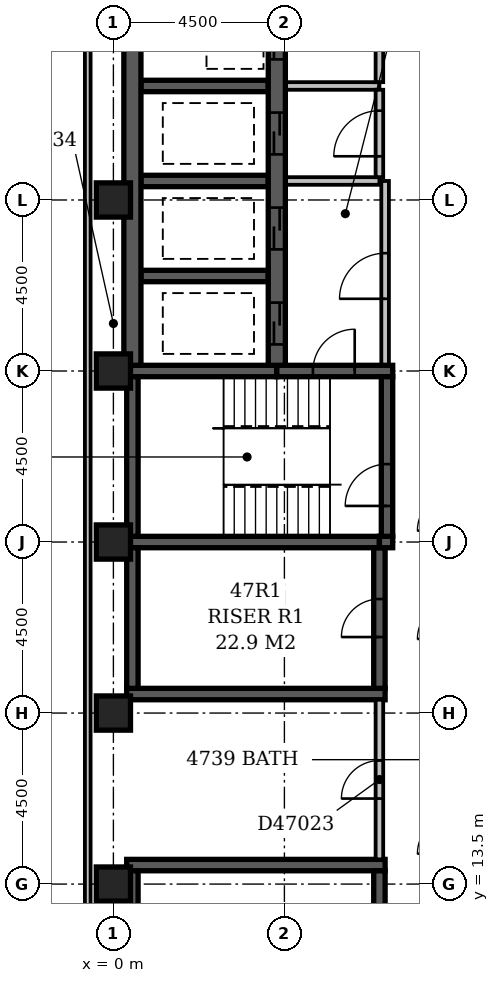
"""IFC4 building model, lengths in metres.
Left out: names, types, materials, properties, quantities, classifications, styles, units other than length and angle.
Written with IfcOpenShell. Run it as: python <this file> out.ifc"""

import sys

from ifc_helpers import new_model, si_unit, direction, frame, frame_2d, origin, origin_2d, place, context, subcontext, project, spatial, rectangle, extrude, element, fill, save


model = new_model("IFC4")
c1 = context("Model", 3, precision=1e-05, world=origin(), true_north=direction((0.0, 1.0)))
c2 = subcontext(c1, "Body", "Model", "MODEL_VIEW")
j1 = project(units=[si_unit("LENGTHUNIT", "METRE"), si_unit("PLANEANGLEUNIT", "RADIAN")], contexts=[c1])
p1 = place(None, origin())
s1 = spatial("IfcSite", under=j1, at=p1, CompositionType="ELEMENT")
p2 = place(p1, origin())
s2 = spatial("IfcBuilding", under=s1, at=p2, CompositionType="ELEMENT")
p3 = place(p2, frame((0.0, 0.0, 186.2)))
s3 = spatial("IfcBuildingStorey", under=s2, at=p3, CompositionType="ELEMENT", Elevation=186.2)
for number, where, z_axis, x_axis in (
    (1, (0.35, 14.0, -0.35), (0.0, 0.0, 1.0), (1.0, 0.0, 0.0)),
    (2, (0.35, 18.5, -0.35), (0.0, 0.0, 1.0), (1.0, 0.0, 0.0)),
):
    element("IfcWall", number, at=place(p3, frame(where, z_axis=z_axis, x_axis=x_axis)), inside=s3, PredefinedType="SHEAR", context=c2, shape_type="SweptSolid", body=[
        extrude(rectangle(XDim=6.8, YDim=0.3, at=frame_2d((3.4, 0.0))), origin(), (0.0, 0.0, 1.0), 3.65),
    ])
p4 = place(p3, frame((0.35, 22.5, -0.35), z_axis=(0.0, 0.0, 1.0), x_axis=(1.0, 0.0, 0.0)))
e3 = element("IfcWall", 3, at=p4, inside=s3, PredefinedType="SHEAR", context=c2, shape_type="SweptSolid", body=[
    extrude(rectangle(XDim=6.65, YDim=0.3, at=frame_2d((3.325, 0.0))), origin(), (0.0, 0.0, 1.0), 3.65),
])
p5 = place(p3, frame((0.35, 27.0, -0.35), z_axis=(0.0, 0.0, 1.0), x_axis=(1.0, 0.0, 0.0)))
e4 = element("IfcWall", 4, at=p5, inside=s3, PredefinedType="SHEAR", context=c2, shape_type="SweptSolid", body=[
    extrude(rectangle(XDim=3.95, YDim=0.3, at=frame_2d((1.975, 0.0))), origin(), (0.0, 0.0, 1.0), 3.65),
])
for number, where, z_axis, x_axis in (
    (5, (0.5, 10.15, -0.35), (0.0, 0.0, 1.0), (0.0, 1.0, 0.0)),
    (6, (0.5, 18.65, -0.35), (0.0, 0.0, 1.0), (0.0, 1.0, 0.0)),
):
    element("IfcWall", number, at=place(p3, frame(where, z_axis=z_axis, x_axis=x_axis)), inside=s3, PredefinedType="SHEAR", context=c2, shape_type="SweptSolid", body=[
        extrude(rectangle(XDim=3.7, YDim=0.3, at=frame_2d((1.85, 0.0))), origin(), (0.0, 0.0, 1.0), 3.65),
    ])
p6 = place(p3, frame((0.5, 22.65, -0.35), z_axis=(0.0, 0.0, 1.0), x_axis=(0.0, 1.0, 0.0)))
e7 = element("IfcWall", 7, at=p6, inside=s3, PredefinedType="SHEAR", context=c2, shape_type="SweptSolid", body=[
    extrude(rectangle(XDim=4.2, YDim=0.3, at=frame_2d((2.1, 0.0))), origin(), (0.0, 0.0, 1.0), 3.65),
])
p7 = place(p3, frame((0.5, 27.15, -0.35), z_axis=(0.0, 0.0, 1.0), x_axis=(0.0, 1.0, 0.0)))
e8 = element("IfcWall", 8, at=p7, inside=s3, PredefinedType="SHEAR", context=c2, shape_type="SweptSolid", body=[
    extrude(rectangle(XDim=22.125, YDim=0.45, at=frame_2d((11.062, 0.0))), origin(), (0.0, 0.0, 1.0), 3.65),
])
for number, where, z_axis, x_axis in (
    (9, (0.725, 29.5, -0.35), (0.0, 0.0, 1.0), (1.0, 0.0, 0.0)),
    (10, (0.725, 32.0, -0.35), (0.0, 0.0, 1.0), (1.0, 0.0, 0.0)),
    (11, (0.725, 34.5, -0.35), (0.0, 0.0, 1.0), (1.0, 0.0, 0.0)),
):
    element("IfcWall", number, at=place(p3, frame(where, z_axis=z_axis, x_axis=x_axis)), inside=s3, PredefinedType="SHEAR", context=c2, shape_type="SweptSolid", body=[
        extrude(rectangle(XDim=3.35, YDim=0.3, at=frame_2d((1.675, 0.0))), origin(), (0.0, 0.0, 1.0), 3.65),
    ])
p8 = place(p3, frame((4.3, 27.0, -0.35), z_axis=(0.0, 0.0, 1.0), x_axis=(1.0, 0.0, 0.0)))
e12 = element("IfcWall", 12, at=p8, inside=s3, PredefinedType="SHEAR", context=c2, shape_type="SweptSolid", body=[
    extrude(rectangle(XDim=3.05, YDim=0.3, at=frame_2d((1.525, 0.0))), origin(), (0.0, 0.0, 1.0), 3.65),
])
p9 = place(p8, frame((0.95, 0.0, 0.35)))
e13 = element("IfcOpeningElement", 13, at=p9, cuts=e12, PredefinedType="OPENING", context=c2, shape_type="SweptSolid", body=[
    extrude(rectangle(XDim=1.1, YDim=2.1, at=frame_2d((0.55, 1.05))), frame((0.0, 0.162, 0.0), z_axis=(0.0, -1.0, 0.0), x_axis=(1.0, 0.0, 0.0)), (0.0, 0.0, 1.0), 0.324),
])
p10 = place(p3, frame((4.3, 27.15, -0.35), z_axis=(0.0, 0.0, 1.0), x_axis=(0.0, 1.0, 0.0)))
e14 = element("IfcWall", 14, at=p10, inside=s3, PredefinedType="SHEAR", context=c2, shape_type="SweptSolid", body=[
    extrude(rectangle(XDim=22.125, YDim=0.45, at=frame_2d((11.062, 0.0))), origin(), (0.0, 0.0, 1.0), 3.65),
])
p11 = place(p10, frame((3.05, 0.0, 0.35)))
e15 = element("IfcOpeningElement", 15, at=p11, cuts=e14, PredefinedType="OPENING", context=c2, shape_type="SweptSolid", body=[
    extrude(rectangle(XDim=1.1, YDim=2.1, at=frame_2d((0.55, 1.05))), frame((0.0, 0.237, 0.0), z_axis=(0.0, -1.0, 0.0), x_axis=(1.0, 0.0, 0.0)), (0.0, 0.0, 1.0), 0.474),
])
p12 = place(p10, frame((0.55, 0.0, 0.35)))
e16 = element("IfcOpeningElement", 16, at=p12, cuts=e14, PredefinedType="OPENING", context=c2, shape_type="SweptSolid", body=[
    extrude(rectangle(XDim=1.1, YDim=2.1, at=frame_2d((0.55, 1.05))), frame((0.0, 0.237, 0.0), z_axis=(0.0, -1.0, 0.0), x_axis=(1.0, 0.0, 0.0)), (0.0, 0.0, 1.0), 0.474),
])
p13 = place(p10, frame((20.55, 0.0, 0.35)))
e17 = element("IfcOpeningElement", 17, at=p13, cuts=e14, PredefinedType="OPENING", context=c2, shape_type="SweptSolid", body=[
    extrude(rectangle(XDim=1.1, YDim=2.1, at=frame_2d((0.55, 1.05))), frame((0.0, 0.237, 0.0), z_axis=(0.0, -1.0, 0.0), x_axis=(1.0, 0.0, 0.0)), (0.0, 0.0, 1.0), 0.474),
])
p14 = place(p10, frame((18.05, 0.0, 0.35)))
e18 = element("IfcOpeningElement", 18, at=p14, cuts=e14, PredefinedType="OPENING", context=c2, shape_type="SweptSolid", body=[
    extrude(rectangle(XDim=1.1, YDim=2.1, at=frame_2d((0.55, 1.05))), frame((0.0, 0.237, 0.0), z_axis=(0.0, -1.0, 0.0), x_axis=(1.0, 0.0, 0.0)), (0.0, 0.0, 1.0), 0.474),
])
p15 = place(p10, frame((15.55, 0.0, 0.35)))
e19 = element("IfcOpeningElement", 19, at=p15, cuts=e14, PredefinedType="OPENING", context=c2, shape_type="SweptSolid", body=[
    extrude(rectangle(XDim=1.1, YDim=2.1, at=frame_2d((0.55, 1.05))), frame((0.0, 0.237, 0.0), z_axis=(0.0, -1.0, 0.0), x_axis=(1.0, 0.0, 0.0)), (0.0, 0.0, 1.0), 0.474),
])
p16 = place(p10, frame((13.05, 0.0, 0.35)))
e20 = element("IfcOpeningElement", 20, at=p16, cuts=e14, PredefinedType="OPENING", context=c2, shape_type="SweptSolid", body=[
    extrude(rectangle(XDim=1.1, YDim=2.1, at=frame_2d((0.55, 1.05))), frame((0.0, 0.237, 0.0), z_axis=(0.0, -1.0, 0.0), x_axis=(1.0, 0.0, 0.0)), (0.0, 0.0, 1.0), 0.474),
])
p17 = place(p10, frame((10.55, 0.0, 0.35)))
e21 = element("IfcOpeningElement", 21, at=p17, cuts=e14, PredefinedType="OPENING", context=c2, shape_type="SweptSolid", body=[
    extrude(rectangle(XDim=1.1, YDim=2.1, at=frame_2d((0.55, 1.05))), frame((0.0, 0.237, 0.0), z_axis=(0.0, -1.0, 0.0), x_axis=(1.0, 0.0, 0.0)), (0.0, 0.0, 1.0), 0.474),
])
p18 = place(p10, frame((8.05, 0.0, 0.35)))
e22 = element("IfcOpeningElement", 22, at=p18, cuts=e14, PredefinedType="OPENING", context=c2, shape_type="SweptSolid", body=[
    extrude(rectangle(XDim=1.1, YDim=2.1, at=frame_2d((0.55, 1.05))), frame((0.0, 0.237, 0.0), z_axis=(0.0, -1.0, 0.0), x_axis=(1.0, 0.0, 0.0)), (0.0, 0.0, 1.0), 0.474),
])
p19 = place(p10, frame((5.55, 0.0, 0.35)))
e23 = element("IfcOpeningElement", 23, at=p19, cuts=e14, PredefinedType="OPENING", context=c2, shape_type="SweptSolid", body=[
    extrude(rectangle(XDim=1.1, YDim=2.1, at=frame_2d((0.55, 1.05))), frame((0.0, 0.237, 0.0), z_axis=(0.0, -1.0, 0.0), x_axis=(1.0, 0.0, 0.0)), (0.0, 0.0, 1.0), 0.474),
])
p20 = place(p3, frame((7.0, 10.15, -0.35), z_axis=(0.0, 0.0, 1.0), x_axis=(0.0, 1.0, 0.0)))
e24 = element("IfcWall", 24, at=p20, inside=s3, PredefinedType="SHEAR", context=c2, shape_type="SweptSolid", body=[
    extrude(rectangle(XDim=3.7, YDim=0.3, at=frame_2d((1.85, 0.0))), origin(), (0.0, 0.0, 1.0), 3.65),
])
p21 = place(p20, frame((1.35, 0.0, 0.35)))
e25 = element("IfcOpeningElement", 25, at=p21, cuts=e24, PredefinedType="OPENING", context=c2, shape_type="SweptSolid", body=[
    extrude(rectangle(XDim=1.0, YDim=2.1, at=frame_2d((0.5, 1.05))), frame((0.0, 0.162, 0.0), z_axis=(0.0, -1.0, 0.0), x_axis=(1.0, 0.0, 0.0)), (0.0, 0.0, 1.0), 0.324),
])
p22 = place(p3, frame((7.0, 18.65, -0.35), z_axis=(0.0, 0.0, 1.0), x_axis=(0.0, 1.0, 0.0)))
e26 = element("IfcWall", 26, at=p22, inside=s3, PredefinedType="SHEAR", context=c2, shape_type="SweptSolid", body=[
    extrude(rectangle(XDim=3.7, YDim=0.3, at=frame_2d((1.85, 0.0))), origin(), (0.0, 0.0, 1.0), 3.65),
])
p23 = place(p22, frame((1.35, 0.0, 0.35)))
e27 = element("IfcOpeningElement", 27, at=p23, cuts=e26, PredefinedType="OPENING", context=c2, shape_type="SweptSolid", body=[
    extrude(rectangle(XDim=1.0, YDim=2.1, at=frame_2d((0.5, 1.05))), frame((0.0, 0.162, 0.0), z_axis=(0.0, -1.0, 0.0), x_axis=(1.0, 0.0, 0.0)), (0.0, 0.0, 1.0), 0.324),
])
p24 = place(p3, frame((7.0, 22.5, -0.35), z_axis=(0.0, 0.0, 1.0), x_axis=(1.0, 0.0, 0.0)))
e28 = element("IfcWall", 28, at=p24, inside=s3, PredefinedType="SHEAR", context=c2, shape_type="SweptSolid", body=[
    extrude(rectangle(XDim=0.35, YDim=0.3, at=frame_2d((0.175, 0.0))), origin(), (0.0, 0.0, 1.0), 3.65),
])
p25 = place(p3, frame((7.2, 22.65, -0.35), z_axis=(0.0, 0.0, 1.0), x_axis=(0.0, 1.0, 0.0)))
e29 = element("IfcWall", 29, at=p25, inside=s3, PredefinedType="SHEAR", context=c2, shape_type="SweptSolid", body=[
    extrude(rectangle(XDim=4.2, YDim=0.3, at=frame_2d((2.1, 0.0))), origin(), (0.0, 0.0, 1.0), 3.65),
])
p26 = place(p25, frame((0.8, 0.0, 0.35)))
e30 = element("IfcOpeningElement", 30, at=p26, cuts=e29, PredefinedType="OPENING", context=c2, shape_type="SweptSolid", body=[
    extrude(rectangle(XDim=1.1, YDim=2.1, at=frame_2d((0.55, 1.05))), frame((0.0, 0.162, 0.0), z_axis=(0.0, -1.0, 0.0), x_axis=(1.0, 0.0, 0.0)), (0.0, 0.0, 1.0), 0.324),
])
for number, where, z_axis, x_axis in (
    (31, (0.0, 13.5, -0.35), (0.0, 0.0, 1.0), (1.0, 0.0, 0.0)),
    (32, (0.0, 18.0, -0.35), (0.0, 0.0, 1.0), (1.0, 0.0, 0.0)),
    (33, (0.0, 22.5, -0.35), (0.0, 0.0, 1.0), (1.0, 0.0, 0.0)),
    (34, (0.0, 27.0, -0.35), (0.0, 0.0, 1.0), (1.0, 0.0, 0.0)),
    (35, (0.0, 31.5, -0.35), (0.0, 0.0, 1.0), (1.0, 0.0, 0.0)),
):
    element("IfcColumn", number, at=place(p3, frame(where, z_axis=z_axis, x_axis=x_axis)), inside=s3, PredefinedType="COLUMN", context=c2, shape_type="SweptSolid", body=[
        extrude(rectangle(XDim=0.9, YDim=0.9, at=origin_2d()), origin(), (0.0, 0.0, 1.0), 3.65),
    ])
p27 = place(p3, frame((-0.675, 59.1, 0.0), z_axis=(0.0, 0.0, 1.0), x_axis=(0.0, -1.0, 0.0)))
e36 = element("IfcWall", 36, at=p27, inside=s3, PredefinedType="STANDARD", context=c2, shape_type="SweptSolid", body=[
    extrude(rectangle(XDim=55.35, YDim=0.15, at=frame_2d((27.675, 0.0))), origin(), (0.0, 0.0, 1.0), 2.7),
])
p28 = place(p3, frame((4.545, 34.5, 0.0), z_axis=(0.0, 0.0, 1.0), x_axis=(1.0, 0.0, 0.0)))
e37 = element("IfcWall", 37, at=p28, inside=s3, PredefinedType="PARTITIONING", context=c2, shape_type="SweptSolid", body=[
    extrude(rectangle(XDim=2.455, YDim=0.2, at=frame_2d((1.228, 0.0))), origin(), (0.0, 0.0, 1.0), 3.3),
])
p29 = place(p3, frame((7.0, 34.6, 0.0), z_axis=(0.0, 0.0, 1.0), x_axis=(0.0, 1.0, 0.0)))
e38 = element("IfcWall", 38, at=p29, inside=s3, PredefinedType="PARTITIONING", context=c2, shape_type="SweptSolid", body=[
    extrude(rectangle(XDim=14.9, YDim=0.2, at=frame_2d((7.45, 0.0))), origin(), (0.0, 0.0, 1.0), 3.3),
])
p30 = place(p29, frame((2.8, 0.0, 0.0)))
e39 = element("IfcOpeningElement", 39, at=p30, cuts=e38, PredefinedType="OPENING", context=c2, shape_type="SweptSolid", body=[
    extrude(rectangle(XDim=1.2, YDim=2.1, at=frame_2d((0.6, 1.05))), frame((0.0, 0.112, 0.0), z_axis=(0.0, -1.0, 0.0), x_axis=(1.0, 0.0, 0.0)), (0.0, 0.0, 1.0), 0.224),
])
p31 = place(p29, frame((9.8, 0.0, 0.0)))
e40 = element("IfcOpeningElement", 40, at=p31, cuts=e38, PredefinedType="OPENING", context=c2, shape_type="SweptSolid", body=[
    extrude(rectangle(XDim=1.2, YDim=2.1, at=frame_2d((0.6, 1.05))), frame((0.0, 0.112, 0.0), z_axis=(0.0, -1.0, 0.0), x_axis=(1.0, 0.0, 0.0)), (0.0, 0.0, 1.0), 0.224),
])
p32 = place(p3, frame((4.545, 32.0, 0.0), z_axis=(0.0, 0.0, 1.0), x_axis=(1.0, 0.0, 0.0)))
e41 = element("IfcWall", 41, at=p32, inside=s3, PredefinedType="PARTITIONING", context=c2, shape_type="SweptSolid", body=[
    extrude(rectangle(XDim=2.455, YDim=0.2, at=frame_2d((1.228, 0.0))), origin(), (0.0, 0.0, 1.0), 3.3),
])
p33 = place(p3, frame((7.0, 32.1, 0.0), z_axis=(0.0, 0.0, 1.0), x_axis=(0.0, 1.0, 0.0)))
e42 = element("IfcWall", 42, at=p33, inside=s3, PredefinedType="PARTITIONING", context=c2, shape_type="SweptSolid", body=[
    extrude(rectangle(XDim=2.3, YDim=0.2, at=frame_2d((1.15, 0.0))), origin(), (0.0, 0.0, 1.0), 3.3),
])
p34 = place(p33, frame((0.55, 0.0, 0.0)))
e43 = element("IfcOpeningElement", 43, at=p34, cuts=e42, PredefinedType="OPENING", context=c2, shape_type="SweptSolid", body=[
    extrude(rectangle(XDim=1.2, YDim=2.1, at=frame_2d((0.6, 1.05))), frame((0.0, 0.112, 0.0), z_axis=(0.0, -1.0, 0.0), x_axis=(1.0, 0.0, 0.0)), (0.0, 0.0, 1.0), 0.224),
])
p35 = place(p3, frame((7.15, 27.17, 0.0), z_axis=(0.0, 0.0, 1.0), x_axis=(0.0, 1.0, 0.0)))
e44 = element("IfcWall", 44, at=p35, inside=s3, PredefinedType="PARTITIONING", context=c2, shape_type="SweptSolid", body=[
    extrude(rectangle(XDim=4.83, YDim=0.2, at=frame_2d((2.415, 0.0))), origin(), (0.0, 0.0, 1.0), 3.3),
])
p36 = place(p35, frame((1.73, 0.0, 0.0)))
e45 = element("IfcOpeningElement", 45, at=p36, cuts=e44, PredefinedType="OPENING", context=c2, shape_type="SweptSolid", body=[
    extrude(rectangle(XDim=1.2, YDim=2.1, at=frame_2d((0.6, 1.05))), frame((0.0, 0.112, 0.0), z_axis=(0.0, -1.0, 0.0), x_axis=(1.0, 0.0, 0.0)), (0.0, 0.0, 1.0), 0.224),
])
p37 = place(p3, frame((7.0, 14.15, 0.0), z_axis=(0.0, 0.0, 1.0), x_axis=(0.0, 1.0, 0.0)))
e46 = element("IfcWall", 46, at=p37, inside=s3, PredefinedType="PARTITIONING", context=c2, shape_type="SweptSolid", body=[
    extrude(rectangle(XDim=4.2, YDim=0.2, at=frame_2d((2.1, 0.0))), origin(), (0.0, 0.0, 1.0), 3.3),
])
p38 = place(p37, frame((1.6, 0.0, 0.0)))
e47 = element("IfcOpeningElement", 47, at=p38, cuts=e46, PredefinedType="OPENING", context=c2, shape_type="SweptSolid", body=[
    extrude(rectangle(XDim=1.0, YDim=2.1, at=frame_2d((0.5, 1.05))), frame((0.0, 0.112, 0.0), z_axis=(0.0, -1.0, 0.0), x_axis=(1.0, 0.0, 0.0)), (0.0, 0.0, 1.0), 0.224),
])
p39 = place(p36, origin())
e48 = element("IfcDoor", 48, at=p39, inside=s3, OperationType="SINGLE_SWING_LEFT", PredefinedType="DOOR", context=c2, shape_type="SweptSolid", body=[
    extrude(rectangle(XDim=1.2, YDim=2.1, at=frame_2d((0.6, 1.05))), frame((0.0, 0.025, 0.0), z_axis=(0.0, -1.0, 0.0), x_axis=(1.0, 0.0, 0.0)), (0.0, 0.0, 1.0), 0.05),
])
fill(e45, e48)
p40 = place(p11, origin())
e49 = element("IfcDoor", 49, at=p40, inside=s3, OperationType="SLIDING_TO_LEFT", PredefinedType="DOOR", context=c2, shape_type="SweptSolid", body=[
    extrude(rectangle(XDim=1.1, YDim=2.1, at=frame_2d((0.55, 1.05))), frame((0.0, 0.025, 0.0), z_axis=(0.0, -1.0, 0.0), x_axis=(1.0, 0.0, 0.0)), (0.0, 0.0, 1.0), 0.05),
])
fill(e15, e49)
p41 = place(p12, origin())
e50 = element("IfcDoor", 50, at=p41, inside=s3, OperationType="SLIDING_TO_LEFT", PredefinedType="DOOR", context=c2, shape_type="SweptSolid", body=[
    extrude(rectangle(XDim=1.1, YDim=2.1, at=frame_2d((0.55, 1.05))), frame((0.0, 0.025, 0.0), z_axis=(0.0, -1.0, 0.0), x_axis=(1.0, 0.0, 0.0)), (0.0, 0.0, 1.0), 0.05),
])
fill(e16, e50)
p42 = place(p18, origin())
e51 = element("IfcDoor", 51, at=p42, inside=s3, OperationType="SLIDING_TO_LEFT", PredefinedType="DOOR", context=c2, shape_type="SweptSolid", body=[
    extrude(rectangle(XDim=1.1, YDim=2.1, at=frame_2d((0.55, 1.05))), frame((0.0, 0.025, 0.0), z_axis=(0.0, -1.0, 0.0), x_axis=(1.0, 0.0, 0.0)), (0.0, 0.0, 1.0), 0.05),
])
fill(e22, e51)
p43 = place(p34, origin())
e52 = element("IfcDoor", 52, at=p43, inside=s3, OperationType="SINGLE_SWING_LEFT", PredefinedType="DOOR", context=c2, shape_type="SweptSolid", body=[
    extrude(rectangle(XDim=1.2, YDim=2.1, at=frame_2d((0.6, 1.05))), frame((0.0, 0.025, 0.0), z_axis=(0.0, -1.0, 0.0), x_axis=(1.0, 0.0, 0.0)), (0.0, 0.0, 1.0), 0.05),
])
fill(e43, e52)
p44 = place(p19, origin())
e53 = element("IfcDoor", 53, at=p44, inside=s3, OperationType="SLIDING_TO_LEFT", PredefinedType="DOOR", context=c2, shape_type="SweptSolid", body=[
    extrude(rectangle(XDim=1.1, YDim=2.1, at=frame_2d((0.55, 1.05))), frame((0.0, 0.025, 0.0), z_axis=(0.0, -1.0, 0.0), x_axis=(1.0, 0.0, 0.0)), (0.0, 0.0, 1.0), 0.05),
])
fill(e23, e53)
p45 = place(p23, origin())
e54 = element("IfcDoor", 54, at=p45, inside=s3, OperationType="SINGLE_SWING_LEFT", PredefinedType="DOOR", context=c2, shape_type="SweptSolid", body=[
    extrude(rectangle(XDim=1.0, YDim=2.1, at=frame_2d((0.5, 1.05))), frame((0.0, 0.025, 0.0), z_axis=(0.0, -1.0, 0.0), x_axis=(1.0, 0.0, 0.0)), (0.0, 0.0, 1.0), 0.05),
])
fill(e27, e54)
p46 = place(p9, frame((1.1, 0.0, 0.0), z_axis=(0.0, 0.0, 1.0), x_axis=(-1.0, 0.0, 0.0)))
e55 = element("IfcDoor", 55, at=p46, inside=s3, OperationType="SINGLE_SWING_LEFT", PredefinedType="DOOR", context=c2, shape_type="SweptSolid", body=[
    extrude(rectangle(XDim=1.1, YDim=2.1, at=frame_2d((0.55, 1.05))), frame((0.0, 0.025, 0.0), z_axis=(0.0, -1.0, 0.0), x_axis=(1.0, 0.0, 0.0)), (0.0, 0.0, 1.0), 0.05),
])
fill(e13, e55)
p47 = place(p26, origin())
e56 = element("IfcDoor", 56, at=p47, inside=s3, OperationType="SINGLE_SWING_LEFT", PredefinedType="DOOR", context=c2, shape_type="SweptSolid", body=[
    extrude(rectangle(XDim=1.1, YDim=2.1, at=frame_2d((0.55, 1.05))), frame((0.0, 0.025, 0.0), z_axis=(0.0, -1.0, 0.0), x_axis=(1.0, 0.0, 0.0)), (0.0, 0.0, 1.0), 0.05),
])
fill(e30, e56)
p48 = place(p38, origin())
e57 = element("IfcDoor", 57, at=p48, inside=s3, OperationType="SINGLE_SWING_LEFT", PredefinedType="DOOR", context=c2, shape_type="SweptSolid", body=[
    extrude(rectangle(XDim=1.0, YDim=2.1, at=frame_2d((0.5, 1.05))), frame((0.0, 0.025, 0.0), z_axis=(0.0, -1.0, 0.0), x_axis=(1.0, 0.0, 0.0)), (0.0, 0.0, 1.0), 0.05),
])
fill(e47, e57)
save(model, sys.argv[1])
